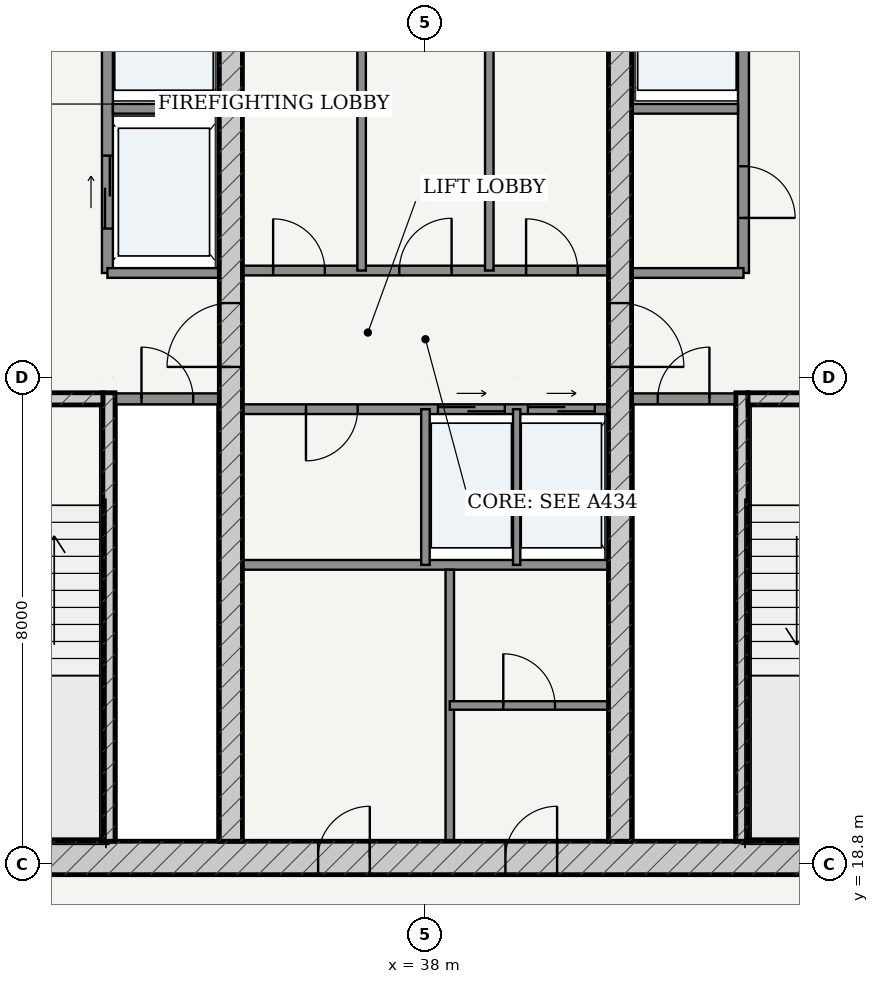
"""IFC4 building model, lengths in metres.
Left out: names, types, materials, properties, quantities, classifications, styles, units other than length and angle.
Written with IfcOpenShell. Run it as: python <this file> out.ifc"""

import sys

from ifc_helpers import new_model, si_unit, direction, frame, frame_2d, origin, place, context, subcontext, project, spatial, rectangle, extrude, source, transform, mapped, element, fill, save


model = new_model("IFC4")
c1 = context("Model", 3, precision=1e-05, world=origin(), true_north=direction((-0.2419218956, 0.970295726276)))
c2 = subcontext(c1, "Body", "Model", "MODEL_VIEW")
j1 = project(units=[si_unit("LENGTHUNIT", "METRE"), si_unit("PLANEANGLEUNIT", "RADIAN")], contexts=[c1])
p1 = place(None, origin())
s1 = spatial("IfcSite", under=j1, at=p1, CompositionType="ELEMENT")
p2 = place(p1, origin())
s2 = spatial("IfcBuilding", under=s1, at=p2, CompositionType="ELEMENT")
p3 = place(p2, frame((0.0, 0.0, 251.95)))
s3 = spatial("IfcBuildingStorey", under=s2, at=p3, CompositionType="ELEMENT", Elevation=251.95)
p4 = place(p3, frame((28.825, 18.9, 0.0), z_axis=(0.0, 0.0, 1.0), x_axis=(1.0, 0.0, 0.0)))
e1 = element("IfcWall", 1, at=p4, inside=s3, PredefinedType="SHEAR", context=c2, shape_type="SweptSolid", body=[
    extrude(rectangle(XDim=18.35, YDim=0.55, at=frame_2d((9.175, 0.0))), origin(), (0.0, 0.0, 1.0), 3.49),
])
p5 = place(p4, frame((7.41, 0.0, 0.0)))
e2 = element("IfcOpeningElement", 2, at=p5, cuts=e1, PredefinedType="OPENING", context=c2, shape_type="SweptSolid", body=[
    extrude(rectangle(XDim=0.85, YDim=2.1, at=frame_2d((0.425, 1.05))), frame((0.0, 0.285, 0.0), z_axis=(0.0, -1.0, 0.0), x_axis=(1.0, 0.0, 0.0)), (0.0, 0.0, 1.0), 0.57),
])
p6 = place(p4, frame((10.49, 0.0, 0.0)))
e3 = element("IfcOpeningElement", 3, at=p6, cuts=e1, PredefinedType="OPENING", context=c2, shape_type="SweptSolid", body=[
    extrude(rectangle(XDim=0.85, YDim=2.1, at=frame_2d((0.425, 1.05))), frame((0.0, 0.285, 0.0), z_axis=(0.0, -1.0, 0.0), x_axis=(1.0, 0.0, 0.0)), (0.0, 0.0, 1.0), 0.57),
])
p7 = place(p3, frame((32.795, 19.175, 0.0), z_axis=(0.0, 0.0, 1.0), x_axis=(0.0, 1.0, 0.0)))
e4 = element("IfcWall", 4, at=p7, inside=s3, PredefinedType="SOLIDWALL", context=c2, shape_type="SweptSolid", body=[
    extrude(rectangle(XDim=7.375, YDim=0.2, at=frame_2d((3.688, 0.0))), origin(), (0.0, 0.0, 1.0), 3.49),
])
p8 = place(p3, frame((29.375, 26.45, 0.0), z_axis=(0.0, 0.0, 1.0), x_axis=(1.0, 0.0, 0.0)))
e5 = element("IfcWall", 5, at=p8, inside=s3, PredefinedType="SOLIDWALL", context=c2, shape_type="SweptSolid", body=[
    extrude(rectangle(XDim=3.32, YDim=0.2, at=frame_2d((1.66, 0.0))), origin(), (0.0, 0.0, 1.0), 3.49),
])
p9 = place(p8, frame((1.185, 0.0, 0.0)))
e6 = element("IfcOpeningElement", 6, at=p9, cuts=e5, PredefinedType="OPENING", context=c2, shape_type="SweptSolid", body=[
    extrude(rectangle(XDim=0.95, YDim=2.15, at=frame_2d((0.475, 1.075))), frame((0.0, 0.11, 0.0), z_axis=(0.0, -1.0, 0.0), x_axis=(1.0, 0.0, 0.0)), (0.0, 0.0, 1.0), 0.22),
])
p10 = place(p3, frame((43.205, 19.175, 0.0), z_axis=(0.0, 0.0, 1.0), x_axis=(0.0, 1.0, 0.0)))
e7 = element("IfcWall", 7, at=p10, inside=s3, PredefinedType="SOLIDWALL", context=c2, shape_type="SweptSolid", body=[
    extrude(rectangle(XDim=7.375, YDim=0.2, at=frame_2d((3.688, 0.0))), origin(), (0.0, 0.0, 1.0), 3.49),
])
p11 = place(p3, frame((43.305, 26.45, 0.0), z_axis=(0.0, 0.0, 1.0), x_axis=(1.0, 0.0, 0.0)))
e8 = element("IfcWall", 8, at=p11, inside=s3, PredefinedType="SOLIDWALL", context=c2, shape_type="SweptSolid", body=[
    extrude(rectangle(XDim=3.32, YDim=0.2, at=frame_2d((1.66, 0.0))), origin(), (0.0, 0.0, 1.0), 3.49),
])
p12 = place(p11, frame((1.185, 0.0, 0.0)))
e9 = element("IfcOpeningElement", 9, at=p12, cuts=e8, PredefinedType="OPENING", context=c2, shape_type="SweptSolid", body=[
    extrude(rectangle(XDim=0.95, YDim=2.15, at=frame_2d((0.475, 1.075))), frame((0.0, 0.11, 0.0), z_axis=(0.0, -1.0, 0.0), x_axis=(1.0, 0.0, 0.0)), (0.0, 0.0, 1.0), 0.22),
])
p13 = place(p3, frame((34.8, 19.175, 0.0), z_axis=(0.0, 0.0, 1.0), x_axis=(0.0, 1.0, 0.0)))
e10 = element("IfcWall", 10, at=p13, inside=s3, PredefinedType="SHEAR", context=c2, shape_type="SweptSolid", body=[
    extrude(rectangle(XDim=15.25, YDim=0.38, at=frame_2d((7.625, 0.0))), origin(), (0.0, 0.0, 1.0), 3.49),
])
p14 = place(p13, frame((7.8, 0.0, 0.0)))
e11 = element("IfcOpeningElement", 11, at=p14, cuts=e10, PredefinedType="OPENING", context=c2, shape_type="SweptSolid", body=[
    extrude(rectangle(XDim=1.05, YDim=2.15, at=frame_2d((0.525, 1.075))), frame((0.0, 0.2, 0.0), z_axis=(0.0, -1.0, 0.0), x_axis=(1.0, 0.0, 0.0)), (0.0, 0.0, 1.0), 0.4),
])
p15 = place(p3, frame((41.2, 19.175, 0.0), z_axis=(0.0, 0.0, 1.0), x_axis=(0.0, 1.0, 0.0)))
e12 = element("IfcWall", 12, at=p15, inside=s3, PredefinedType="SHEAR", context=c2, shape_type="SweptSolid", body=[
    extrude(rectangle(XDim=15.25, YDim=0.38, at=frame_2d((7.625, 0.0))), origin(), (0.0, 0.0, 1.0), 3.49),
])
p16 = place(p15, frame((7.8, 0.0, 0.0)))
e13 = element("IfcOpeningElement", 13, at=p16, cuts=e12, PredefinedType="OPENING", context=c2, shape_type="SweptSolid", body=[
    extrude(rectangle(XDim=1.05, YDim=2.15, at=frame_2d((0.525, 1.075))), frame((0.0, 0.2, 0.0), z_axis=(0.0, -1.0, 0.0), x_axis=(1.0, 0.0, 0.0)), (0.0, 0.0, 1.0), 0.4),
])
p17 = place(p3, frame((32.9, 26.45, 0.0), z_axis=(0.0, 0.0, 1.0), x_axis=(1.0, 0.0, 0.0)))
e14 = element("IfcWall", 14, at=p17, inside=s3, PredefinedType="PARTITIONING", context=c2, shape_type="SweptSolid", body=[
    extrude(rectangle(XDim=1.71, YDim=0.18, at=frame_2d((0.855, 0.0))), origin(), (0.0, 0.0, 1.0), 3.49),
])
p18 = place(p17, frame((0.43, 0.0, 0.0)))
e15 = element("IfcOpeningElement", 15, at=p18, cuts=e14, PredefinedType="OPENING", context=c2, shape_type="SweptSolid", body=[
    extrude(rectangle(XDim=0.85, YDim=2.1, at=frame_2d((0.425, 1.05))), frame((0.0, 0.1, 0.0), z_axis=(0.0, -1.0, 0.0), x_axis=(1.0, 0.0, 0.0)), (0.0, 0.0, 1.0), 0.2),
])
p19 = place(p3, frame((41.39, 26.45, 0.0), z_axis=(0.0, 0.0, 1.0), x_axis=(1.0, 0.0, 0.0)))
e16 = element("IfcWall", 16, at=p19, inside=s3, PredefinedType="PARTITIONING", context=c2, shape_type="SweptSolid", body=[
    extrude(rectangle(XDim=1.71, YDim=0.18, at=frame_2d((0.855, 0.0))), origin(), (0.0, 0.0, 1.0), 3.49),
])
p20 = place(p19, frame((0.43, 0.0, 0.0)))
e17 = element("IfcOpeningElement", 17, at=p20, cuts=e16, PredefinedType="OPENING", context=c2, shape_type="SweptSolid", body=[
    extrude(rectangle(XDim=0.85, YDim=2.1, at=frame_2d((0.425, 1.05))), frame((0.0, 0.1, 0.0), z_axis=(0.0, -1.0, 0.0), x_axis=(1.0, 0.0, 0.0)), (0.0, 0.0, 1.0), 0.2),
])
p21 = place(p3, frame((32.77, 28.52, 0.0), z_axis=(0.0, 0.0, 1.0), x_axis=(0.0, 1.0, 0.0)))
e18 = element("IfcWall", 18, at=p21, inside=s3, PredefinedType="PARTITIONING", context=c2, shape_type="SweptSolid", body=[
    extrude(rectangle(XDim=5.905, YDim=0.18, at=frame_2d((2.953, 0.0))), origin(), (0.0, 0.0, 1.0), 3.49),
])
p22 = place(p21, frame((3.655, 0.0, 0.0)))
e19 = element("IfcOpeningElement", 19, at=p22, cuts=e18, PredefinedType="OPENING", context=c2, shape_type="SweptSolid", body=[
    extrude(rectangle(XDim=1.15, YDim=2.2, at=frame_2d((0.575, 1.1))), frame((0.0, 0.1, 0.0), z_axis=(0.0, -1.0, 0.0), x_axis=(1.0, 0.0, 0.0)), (0.0, 0.0, 1.0), 0.2),
])
p23 = place(p21, frame((0.73, 0.0, 0.0)))
e20 = element("IfcOpeningElement", 20, at=p23, cuts=e18, PredefinedType="OPENING", context=c2, shape_type="SweptSolid", body=[
    extrude(rectangle(XDim=1.2, YDim=2.25, at=frame_2d((0.6, 1.125))), frame((0.0, 0.1, 0.0), z_axis=(0.0, -1.0, 0.0), x_axis=(1.0, 0.0, 0.0)), (0.0, 0.0, 1.0), 0.2),
])
p24 = place(p3, frame((32.86, 31.22, 0.0), z_axis=(0.0, 0.0, 1.0), x_axis=(1.0, 0.0, 0.0)))
e21 = element("IfcWall", 21, at=p24, inside=s3, PredefinedType="PARTITIONING", context=c2, shape_type="SweptSolid", body=[
    extrude(rectangle(XDim=1.75, YDim=0.16, at=frame_2d((0.875, 0.0))), origin(), (0.0, 0.0, 1.0), 3.49),
])
p25 = place(p3, frame((32.77, 28.52, 0.0), z_axis=(0.0, 0.0, 1.0), x_axis=(1.0, 0.0, 0.0)))
e22 = element("IfcWall", 22, at=p25, inside=s3, PredefinedType="PARTITIONING", context=c2, shape_type="SweptSolid", body=[
    extrude(rectangle(XDim=1.84, YDim=0.16, at=frame_2d((0.92, 0.0))), origin(), (0.0, 0.0, 1.0), 3.49),
])
p26 = place(p3, frame((43.23, 28.52, 0.0), z_axis=(0.0, 0.0, 1.0), x_axis=(0.0, 1.0, 0.0)))
e23 = element("IfcWall", 23, at=p26, inside=s3, PredefinedType="PARTITIONING", context=c2, shape_type="SweptSolid", body=[
    extrude(rectangle(XDim=5.905, YDim=0.18, at=frame_2d((2.953, 0.0))), origin(), (0.0, 0.0, 1.0), 3.49),
])
p27 = place(p26, frame((0.905, 0.0, 0.0)))
e24 = element("IfcOpeningElement", 24, at=p27, cuts=e23, PredefinedType="OPENING", context=c2, shape_type="SweptSolid", body=[
    extrude(rectangle(XDim=0.85, YDim=2.1, at=frame_2d((0.425, 1.05))), frame((0.0, 0.1, 0.0), z_axis=(0.0, -1.0, 0.0), x_axis=(1.0, 0.0, 0.0)), (0.0, 0.0, 1.0), 0.2),
])
p28 = place(p26, frame((3.655, 0.0, 0.0)))
e25 = element("IfcOpeningElement", 25, at=p28, cuts=e23, PredefinedType="OPENING", context=c2, shape_type="SweptSolid", body=[
    extrude(rectangle(XDim=1.15, YDim=2.2, at=frame_2d((0.575, 1.1))), frame((0.0, 0.1, 0.0), z_axis=(0.0, -1.0, 0.0), x_axis=(1.0, 0.0, 0.0)), (0.0, 0.0, 1.0), 0.2),
])
p29 = place(p3, frame((41.39, 31.22, 0.0), z_axis=(0.0, 0.0, 1.0), x_axis=(1.0, 0.0, 0.0)))
e26 = element("IfcWall", 26, at=p29, inside=s3, PredefinedType="PARTITIONING", context=c2, shape_type="SweptSolid", body=[
    extrude(rectangle(XDim=1.75, YDim=0.16, at=frame_2d((0.875, 0.0))), origin(), (0.0, 0.0, 1.0), 3.49),
])
p30 = place(p3, frame((41.39, 28.52, 0.0), z_axis=(0.0, 0.0, 1.0), x_axis=(1.0, 0.0, 0.0)))
e27 = element("IfcWall", 27, at=p30, inside=s3, PredefinedType="PARTITIONING", context=c2, shape_type="SweptSolid", body=[
    extrude(rectangle(XDim=1.84, YDim=0.16, at=frame_2d((0.92, 0.0))), origin(), (0.0, 0.0, 1.0), 3.49),
])
p31 = place(p3, frame((34.99, 28.56, 0.0), z_axis=(0.0, 0.0, 1.0), x_axis=(1.0, 0.0, 0.0)))
e28 = element("IfcWall", 28, at=p31, inside=s3, PredefinedType="PARTITIONING", context=c2, shape_type="SweptSolid", body=[
    extrude(rectangle(XDim=6.02, YDim=0.16, at=frame_2d((3.01, 0.0))), origin(), (0.0, 0.0, 1.0), 3.49),
])
p32 = place(p31, frame((0.505, 0.0, 0.0)))
e29 = element("IfcOpeningElement", 29, at=p32, cuts=e28, PredefinedType="OPENING", context=c2, shape_type="SweptSolid", body=[
    extrude(rectangle(XDim=0.85, YDim=2.1, at=frame_2d((0.425, 1.05))), frame((0.0, 0.09, 0.0), z_axis=(0.0, -1.0, 0.0), x_axis=(1.0, 0.0, 0.0)), (0.0, 0.0, 1.0), 0.18),
])
p33 = place(p31, frame((2.58, 0.0, 0.0)))
e30 = element("IfcOpeningElement", 30, at=p33, cuts=e28, PredefinedType="OPENING", context=c2, shape_type="SweptSolid", body=[
    extrude(rectangle(XDim=0.86, YDim=2.1, at=frame_2d((0.43, 1.05))), frame((0.0, 0.09, 0.0), z_axis=(0.0, -1.0, 0.0), x_axis=(1.0, 0.0, 0.0)), (0.0, 0.0, 1.0), 0.18),
])
p34 = place(p31, frame((4.665, 0.0, 0.0)))
e31 = element("IfcOpeningElement", 31, at=p34, cuts=e28, PredefinedType="OPENING", context=c2, shape_type="SweptSolid", body=[
    extrude(rectangle(XDim=0.85, YDim=2.1, at=frame_2d((0.425, 1.05))), frame((0.0, 0.09, 0.0), z_axis=(0.0, -1.0, 0.0), x_axis=(1.0, 0.0, 0.0)), (0.0, 0.0, 1.0), 0.18),
])
for number, where, z_axis, x_axis in (
    (32, (36.95, 28.56, 0.0), (0.0, 0.0, 1.0), (0.0, 1.0, 0.0)),
    (33, (39.05, 28.56, 0.0), (0.0, 0.0, 1.0), (0.0, 1.0, 0.0)),
):
    element("IfcWall", number, at=place(p3, frame(where, z_axis=z_axis, x_axis=x_axis)), inside=s3, PredefinedType="PARTITIONING", context=c2, shape_type="SweptSolid", body=[
        extrude(rectangle(XDim=5.865, YDim=0.14, at=frame_2d((2.933, 0.0))), origin(), (0.0, 0.0, 1.0), 3.49),
    ])
p35 = place(p3, frame((34.99, 26.28, 0.0), z_axis=(0.0, 0.0, 1.0), x_axis=(1.0, 0.0, 0.0)))
e34 = element("IfcWall", 34, at=p35, inside=s3, PredefinedType="PARTITIONING", context=c2, shape_type="SweptSolid", body=[
    extrude(rectangle(XDim=6.02, YDim=0.16, at=frame_2d((3.01, 0.0))), origin(), (0.0, 0.0, 1.0), 3.49),
])
p36 = place(p35, frame((1.045, 0.0, 0.0)))
e35 = element("IfcOpeningElement", 35, at=p36, cuts=e34, PredefinedType="OPENING", context=c2, shape_type="SweptSolid", body=[
    extrude(rectangle(XDim=0.85, YDim=2.1, at=frame_2d((0.425, 1.05))), frame((0.0, 0.09, 0.0), z_axis=(0.0, -1.0, 0.0), x_axis=(1.0, 0.0, 0.0)), (0.0, 0.0, 1.0), 0.18),
])
p37 = place(p35, frame((3.215, 0.0, 0.0)))
e36 = element("IfcOpeningElement", 36, at=p37, cuts=e34, PredefinedType="OPENING", context=c2, shape_type="SweptSolid", body=[
    extrude(rectangle(XDim=1.1, YDim=2.2, at=frame_2d((0.55, 1.1))), frame((0.0, 0.09, 0.0), z_axis=(0.0, -1.0, 0.0), x_axis=(1.0, 0.0, 0.0)), (0.0, 0.0, 1.0), 0.18),
])
p38 = place(p35, frame((4.695, 0.0, 0.0)))
e37 = element("IfcOpeningElement", 37, at=p38, cuts=e34, PredefinedType="OPENING", context=c2, shape_type="SweptSolid", body=[
    extrude(rectangle(XDim=1.1, YDim=2.2, at=frame_2d((0.55, 1.1))), frame((0.0, 0.09, 0.0), z_axis=(0.0, -1.0, 0.0), x_axis=(1.0, 0.0, 0.0)), (0.0, 0.0, 1.0), 0.18),
])
p39 = place(p3, frame((34.99, 23.72, 0.0), z_axis=(0.0, 0.0, 1.0), x_axis=(1.0, 0.0, 0.0)))
e38 = element("IfcWall", 38, at=p39, inside=s3, PredefinedType="PARTITIONING", context=c2, shape_type="SweptSolid", body=[
    extrude(rectangle(XDim=6.02, YDim=0.16, at=frame_2d((3.01, 0.0))), origin(), (0.0, 0.0, 1.0), 3.49),
])
p40 = place(p3, frame((38.0, 23.72, 0.0), z_axis=(0.0, 0.0, 1.0), x_axis=(0.0, 1.0, 0.0)))
e39 = element("IfcWall", 39, at=p40, inside=s3, PredefinedType="PARTITIONING", context=c2, shape_type="SweptSolid", body=[
    extrude(rectangle(XDim=2.56, YDim=0.14, at=frame_2d((1.28, 0.0))), origin(), (0.0, 0.0, 1.0), 3.49),
])
p41 = place(p3, frame((39.5, 23.72, 0.0), z_axis=(0.0, 0.0, 1.0), x_axis=(0.0, 1.0, 0.0)))
e40 = element("IfcWall", 40, at=p41, inside=s3, PredefinedType="PARTITIONING", context=c2, shape_type="SweptSolid", body=[
    extrude(rectangle(XDim=2.56, YDim=0.12, at=frame_2d((1.28, 0.0))), origin(), (0.0, 0.0, 1.0), 3.49),
])
p42 = place(p3, frame((38.4, 19.175, 0.0), z_axis=(0.0, 0.0, 1.0), x_axis=(0.0, 1.0, 0.0)))
e41 = element("IfcWall", 41, at=p42, inside=s3, PredefinedType="PARTITIONING", context=c2, shape_type="SweptSolid", body=[
    extrude(rectangle(XDim=4.465, YDim=0.14, at=frame_2d((2.232, 0.0))), origin(), (0.0, 0.0, 1.0), 3.49),
])
p43 = place(p3, frame((38.4, 21.407, 0.0), z_axis=(0.0, 0.0, 1.0), x_axis=(1.0, 0.0, 0.0)))
e42 = element("IfcWall", 42, at=p43, inside=s3, PredefinedType="PARTITIONING", context=c2, shape_type="SweptSolid", body=[
    extrude(rectangle(XDim=2.61, YDim=0.14, at=frame_2d((1.305, 0.0))), origin(), (0.0, 0.0, 1.0), 3.49),
])
p44 = place(p43, frame((0.88, 0.0, 0.0)))
e43 = element("IfcOpeningElement", 43, at=p44, cuts=e42, PredefinedType="OPENING", context=c2, shape_type="SweptSolid", body=[
    extrude(rectangle(XDim=0.85, YDim=2.1, at=frame_2d((0.425, 1.05))), frame((0.0, 0.08, 0.0), z_axis=(0.0, -1.0, 0.0), x_axis=(1.0, 0.0, 0.0)), (0.0, 0.0, 1.0), 0.16),
])
m1 = source(origin(), c2, "Body", "SweptSolid", [
    extrude(rectangle(XDim=1.05, YDim=2.15, at=frame_2d((0.525, 1.075))), frame((0.0, 0.025, 0.0), z_axis=(0.0, -1.0, 0.0), x_axis=(1.0, 0.0, 0.0)), (0.0, 0.0, 1.0), 0.05),
])
p45 = place(p14, origin())
e44 = element("IfcDoor", 44, at=p45, inside=s3, OperationType="SINGLE_SWING_LEFT", PredefinedType="DOOR", context=c2, shape_type="MappedRepresentation", body=[
    mapped(m1, transform((0.0, 0.0, 0.0), scale=1.0)),
])
fill(e11, e44)
p46 = place(p16, frame((1.05, 0.0, 0.0), z_axis=(0.0, 0.0, 1.0), x_axis=(-1.0, 0.0, 0.0)))
e45 = element("IfcDoor", 45, at=p46, inside=s3, OperationType="SINGLE_SWING_RIGHT", PredefinedType="DOOR", context=c2, shape_type="MappedRepresentation", body=[
    mapped(m1, transform((0.0, 0.0, 0.0), scale=1.0)),
])
fill(e13, e45)
m2 = source(origin(), c2, "Body", "SweptSolid", [
    extrude(rectangle(XDim=0.85, YDim=2.1, at=frame_2d((0.425, 1.05))), frame((0.0, 0.025, 0.0), z_axis=(0.0, -1.0, 0.0), x_axis=(1.0, 0.0, 0.0)), (0.0, 0.0, 1.0), 0.05),
])
p47 = place(p18, origin())
e46 = element("IfcDoor", 46, at=p47, inside=s3, OperationType="SINGLE_SWING_LEFT", PredefinedType="DOOR", context=c2, shape_type="MappedRepresentation", body=[
    mapped(m2, transform((0.0, 0.0, 0.0), scale=1.0)),
])
fill(e15, e46)
p48 = place(p20, origin())
e47 = element("IfcDoor", 47, at=p48, inside=s3, OperationType="SINGLE_SWING_RIGHT", PredefinedType="DOOR", context=c2, shape_type="MappedRepresentation", body=[
    mapped(m2, transform((0.0, 0.0, 0.0), scale=1.0)),
])
fill(e17, e47)
p49 = place(p27, frame((0.85, 0.0, 0.0), z_axis=(0.0, 0.0, 1.0), x_axis=(-1.0, 0.0, 0.0)))
e48 = element("IfcDoor", 48, at=p49, inside=s3, OperationType="SINGLE_SWING_RIGHT", PredefinedType="DOOR", context=c2, shape_type="MappedRepresentation", body=[
    mapped(m2, transform((0.0, 0.0, 0.0), scale=1.0)),
])
fill(e24, e48)
p50 = place(p32, origin())
e49 = element("IfcDoor", 49, at=p50, inside=s3, OperationType="SINGLE_SWING_LEFT", PredefinedType="DOOR", context=c2, shape_type="MappedRepresentation", body=[
    mapped(m2, transform((0.0, 0.0, 0.0), scale=1.0)),
])
fill(e29, e49)
m3 = source(origin(), c2, "Body", "SweptSolid", [
    extrude(rectangle(XDim=0.86, YDim=2.1, at=frame_2d((0.43, 1.05))), frame((0.0, 0.025, 0.0), z_axis=(0.0, -1.0, 0.0), x_axis=(1.0, 0.0, 0.0)), (0.0, 0.0, 1.0), 0.05),
])
p51 = place(p33, origin())
e50 = element("IfcDoor", 50, at=p51, inside=s3, OperationType="SINGLE_SWING_RIGHT", PredefinedType="DOOR", context=c2, shape_type="MappedRepresentation", body=[
    mapped(m3, transform((0.0, 0.0, 0.0), scale=1.0)),
])
fill(e30, e50)
p52 = place(p34, origin())
e51 = element("IfcDoor", 51, at=p52, inside=s3, OperationType="SINGLE_SWING_LEFT", PredefinedType="DOOR", context=c2, shape_type="MappedRepresentation", body=[
    mapped(m2, transform((0.0, 0.0, 0.0), scale=1.0)),
])
fill(e31, e51)
p53 = place(p36, frame((0.85, 0.0, 0.0), z_axis=(0.0, 0.0, 1.0), x_axis=(-1.0, 0.0, 0.0)))
e52 = element("IfcDoor", 52, at=p53, inside=s3, OperationType="SINGLE_SWING_RIGHT", PredefinedType="DOOR", context=c2, shape_type="MappedRepresentation", body=[
    mapped(m2, transform((0.0, 0.0, 0.0), scale=1.0)),
])
fill(e35, e52)
p54 = place(p5, origin())
e53 = element("IfcDoor", 53, at=p54, inside=s3, OperationType="SINGLE_SWING_RIGHT", PredefinedType="DOOR", context=c2, shape_type="MappedRepresentation", body=[
    mapped(m2, transform((0.0, 0.0, 0.0), scale=1.0)),
])
fill(e2, e53)
p55 = place(p6, origin())
e54 = element("IfcDoor", 54, at=p55, inside=s3, OperationType="SINGLE_SWING_RIGHT", PredefinedType="DOOR", context=c2, shape_type="MappedRepresentation", body=[
    mapped(m2, transform((0.0, 0.0, 0.0), scale=1.0)),
])
fill(e3, e54)
p56 = place(p44, origin())
e55 = element("IfcDoor", 55, at=p56, inside=s3, OperationType="SINGLE_SWING_LEFT", PredefinedType="DOOR", context=c2, shape_type="MappedRepresentation", body=[
    mapped(m2, transform((0.0, 0.0, 0.0), scale=1.0)),
])
fill(e43, e55)
m4 = source(origin(), c2, "Body", "SweptSolid", [
    extrude(rectangle(XDim=1.2, YDim=2.25, at=frame_2d((0.6, 1.125))), frame((0.0, 0.025, 0.0), z_axis=(0.0, -1.0, 0.0), x_axis=(1.0, 0.0, 0.0)), (0.0, 0.0, 1.0), 0.05),
])
p57 = place(p23, origin())
e56 = element("IfcDoor", 56, at=p57, inside=s3, OperationType="DOUBLE_DOOR_SLIDING", PredefinedType="DOOR", context=c2, shape_type="MappedRepresentation", body=[
    mapped(m4, transform((0.0, 0.0, 0.0), scale=1.0)),
])
fill(e20, e56)
m5 = source(origin(), c2, "Body", "SweptSolid", [
    extrude(rectangle(XDim=1.1, YDim=2.2, at=frame_2d((0.55, 1.1))), frame((0.0, 0.025, 0.0), z_axis=(0.0, -1.0, 0.0), x_axis=(1.0, 0.0, 0.0)), (0.0, 0.0, 1.0), 0.05),
])
p58 = place(p37, origin())
e57 = element("IfcDoor", 57, at=p58, inside=s3, OperationType="DOUBLE_DOOR_SLIDING", PredefinedType="DOOR", context=c2, shape_type="MappedRepresentation", body=[
    mapped(m5, transform((0.0, 0.0, 0.0), scale=1.0)),
])
fill(e36, e57)
p59 = place(p38, origin())
e58 = element("IfcDoor", 58, at=p59, inside=s3, OperationType="DOUBLE_DOOR_SLIDING", PredefinedType="DOOR", context=c2, shape_type="MappedRepresentation", body=[
    mapped(m5, transform((0.0, 0.0, 0.0), scale=1.0)),
])
fill(e37, e58)
save(model, sys.argv[1])
